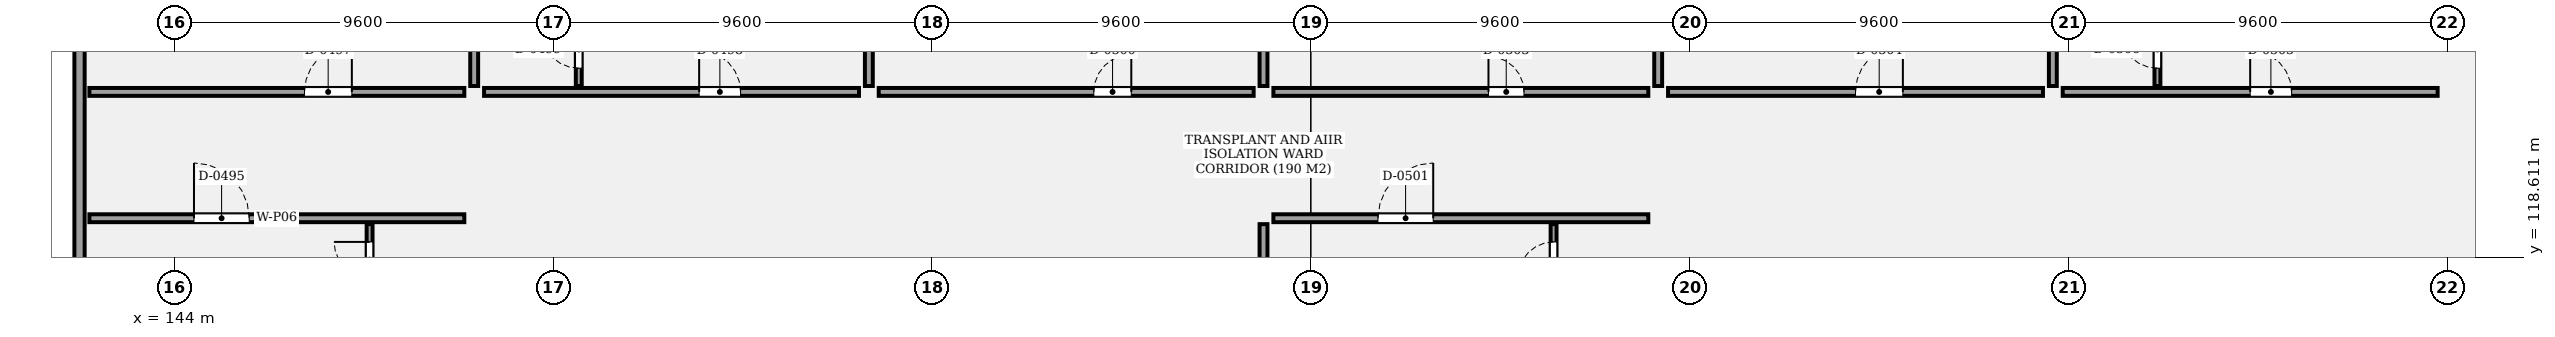
"""IFC4 building model, lengths in metres.
Left out: names, types, materials, properties, quantities, classifications, styles, units other than length and angle.
Written with IfcOpenShell. Run it as: python <this file> out.ifc"""

import sys

from ifc_helpers import new_model, si_unit, direction, frame, frame_2d, origin, place, context, subcontext, project, spatial, rectangle, extrude, element, fill, save


model = new_model("IFC4")
c1 = context("Model", 3, precision=1e-05, world=origin(), true_north=direction((0.0, 1.0)))
c2 = subcontext(c1, "Body", "Model", "MODEL_VIEW")
j1 = project(units=[si_unit("LENGTHUNIT", "METRE"), si_unit("PLANEANGLEUNIT", "RADIAN")], contexts=[c1])
p1 = place(None, origin())
s1 = spatial("IfcSite", under=j1, at=p1, CompositionType="ELEMENT")
p2 = place(p1, origin())
s2 = spatial("IfcBuilding", under=s1, at=p2, CompositionType="ELEMENT")
p3 = place(p2, frame((0.0, 0.0, 30.4)))
s3 = spatial("IfcBuildingStorey", under=s2, at=p3, CompositionType="ELEMENT", Elevation=30.4)
p4 = place(p3, frame((141.6, 108.16, 0.0), z_axis=(0.0, 0.0, 1.0), x_axis=(0.0, 1.0, 0.0)))
e1 = element("IfcWall", 1, at=p4, inside=s3, PredefinedType="SOLIDWALL", context=c2, shape_type="SweptSolid", body=[
    extrude(rectangle(XDim=26.08, YDim=0.26, at=frame_2d((13.04, 0.0))), origin(), (0.0, 0.0, 1.0), 2.58),
])
p5 = place(p3, frame((141.85, 119.6, 0.0), z_axis=(0.0, 0.0, 1.0), x_axis=(1.0, 0.0, 0.0)))
e2 = element("IfcWall", 2, at=p5, inside=s3, PredefinedType="PARTITIONING", context=c2, shape_type="SweptSolid", body=[
    extrude(rectangle(XDim=9.5, YDim=0.2, at=frame_2d((4.75, 0.0))), origin(), (0.0, 0.0, 1.0), 2.58),
])
p6 = place(p5, frame((2.65, 0.0, 0.0)))
e3 = element("IfcOpeningElement", 3, at=p6, cuts=e2, PredefinedType="OPENING", context=c2, shape_type="SweptSolid", body=[
    extrude(rectangle(XDim=1.4, YDim=2.4, at=frame_2d((0.7, 1.2))), frame((0.0, 0.11, 0.0), z_axis=(0.0, -1.0, 0.0), x_axis=(1.0, 0.0, 0.0)), (0.0, 0.0, 1.0), 0.22),
])
p7 = place(p3, frame((148.95, 117.15, 0.0), z_axis=(0.0, 0.0, 1.0), x_axis=(0.0, 1.0, 0.0)))
e4 = element("IfcWall", 4, at=p7, inside=s3, PredefinedType="PARTITIONING", context=c2, shape_type="SweptSolid", body=[
    extrude(rectangle(XDim=2.3, YDim=0.15, at=frame_2d((1.15, 0.0))), origin(), (0.0, 0.0, 1.0), 2.58),
])
p8 = place(p7, frame((0.95, 0.0, 0.0)))
e5 = element("IfcOpeningElement", 5, at=p8, cuts=e4, PredefinedType="OPENING", context=c2, shape_type="SweptSolid", body=[
    extrude(rectangle(XDim=0.9, YDim=2.1, at=frame_2d((0.45, 1.05))), frame((0.0, 0.085, 0.0), z_axis=(0.0, -1.0, 0.0), x_axis=(1.0, 0.0, 0.0)), (0.0, 0.0, 1.0), 0.17),
])
p9 = place(p3, frame((141.85, 122.8, 0.0), z_axis=(0.0, 0.0, 1.0), x_axis=(1.0, 0.0, 0.0)))
e6 = element("IfcWall", 6, at=p9, inside=s3, PredefinedType="PARTITIONING", context=c2, shape_type="SweptSolid", body=[
    extrude(rectangle(XDim=9.5, YDim=0.2, at=frame_2d((4.75, 0.0))), origin(), (0.0, 0.0, 1.0), 2.58),
])
p10 = place(p9, frame((5.45, 0.0, 0.0)))
e7 = element("IfcOpeningElement", 7, at=p10, cuts=e6, PredefinedType="OPENING", context=c2, shape_type="SweptSolid", body=[
    extrude(rectangle(XDim=1.2, YDim=2.4, at=frame_2d((0.6, 1.2))), frame((0.0, 0.11, 0.0), z_axis=(0.0, -1.0, 0.0), x_axis=(1.0, 0.0, 0.0)), (0.0, 0.0, 1.0), 0.22),
])
p11 = place(p3, frame((151.85, 122.8, 0.0), z_axis=(0.0, 0.0, 1.0), x_axis=(1.0, 0.0, 0.0)))
e8 = element("IfcWall", 8, at=p11, inside=s3, PredefinedType="PARTITIONING", context=c2, shape_type="SweptSolid", body=[
    extrude(rectangle(XDim=9.5, YDim=0.2, at=frame_2d((4.75, 0.0))), origin(), (0.0, 0.0, 1.0), 2.58),
])
p12 = place(p11, frame((5.45, 0.0, 0.0)))
e9 = element("IfcOpeningElement", 9, at=p12, cuts=e8, PredefinedType="OPENING", context=c2, shape_type="SweptSolid", body=[
    extrude(rectangle(XDim=1.05, YDim=2.2, at=frame_2d((0.525, 1.1))), frame((0.0, 0.11, 0.0), z_axis=(0.0, -1.0, 0.0), x_axis=(1.0, 0.0, 0.0)), (0.0, 0.0, 1.0), 0.22),
])
p13 = place(p3, frame((154.25, 122.95, 0.0), z_axis=(0.0, 0.0, 1.0), x_axis=(0.0, 1.0, 0.0)))
e10 = element("IfcWall", 10, at=p13, inside=s3, PredefinedType="PARTITIONING", context=c2, shape_type="SweptSolid", body=[
    extrude(rectangle(XDim=2.3, YDim=0.15, at=frame_2d((1.15, 0.0))), origin(), (0.0, 0.0, 1.0), 2.58),
])
p14 = place(p13, frame((0.45, 0.0, 0.0)))
e11 = element("IfcOpeningElement", 11, at=p14, cuts=e10, PredefinedType="OPENING", context=c2, shape_type="SweptSolid", body=[
    extrude(rectangle(XDim=0.95, YDim=2.1, at=frame_2d((0.475, 1.05))), frame((0.0, 0.085, 0.0), z_axis=(0.0, -1.0, 0.0), x_axis=(1.0, 0.0, 0.0)), (0.0, 0.0, 1.0), 0.17),
])
p15 = place(p3, frame((151.6, 122.95, 0.0), z_axis=(0.0, 0.0, 1.0), x_axis=(0.0, 1.0, 0.0)))
e12 = element("IfcWall", 12, at=p15, inside=s3, PredefinedType="PARTITIONING", context=c2, shape_type="SweptSolid", body=[
    extrude(rectangle(XDim=10.9, YDim=0.2, at=frame_2d((5.45, 0.0))), origin(), (0.0, 0.0, 1.0), 2.58),
])
p16 = place(p3, frame((161.85, 122.8, 0.0), z_axis=(0.0, 0.0, 1.0), x_axis=(1.0, 0.0, 0.0)))
e13 = element("IfcWall", 13, at=p16, inside=s3, PredefinedType="PARTITIONING", context=c2, shape_type="SweptSolid", body=[
    extrude(rectangle(XDim=9.5, YDim=0.2, at=frame_2d((4.75, 0.0))), origin(), (0.0, 0.0, 1.0), 2.58),
])
p17 = place(p16, frame((5.45, 0.0, 0.0)))
e14 = element("IfcOpeningElement", 14, at=p17, cuts=e13, PredefinedType="OPENING", context=c2, shape_type="SweptSolid", body=[
    extrude(rectangle(XDim=0.95, YDim=2.1, at=frame_2d((0.475, 1.05))), frame((0.0, 0.11, 0.0), z_axis=(0.0, -1.0, 0.0), x_axis=(1.0, 0.0, 0.0)), (0.0, 0.0, 1.0), 0.22),
])
p18 = place(p3, frame((161.6, 122.95, 0.0), z_axis=(0.0, 0.0, 1.0), x_axis=(0.0, 1.0, 0.0)))
e15 = element("IfcWall", 15, at=p18, inside=s3, PredefinedType="PARTITIONING", context=c2, shape_type="SweptSolid", body=[
    extrude(rectangle(XDim=10.9, YDim=0.2, at=frame_2d((5.45, 0.0))), origin(), (0.0, 0.0, 1.0), 2.58),
])
p19 = place(p3, frame((171.85, 119.6, 0.0), z_axis=(0.0, 0.0, 1.0), x_axis=(1.0, 0.0, 0.0)))
e16 = element("IfcWall", 16, at=p19, inside=s3, PredefinedType="PARTITIONING", context=c2, shape_type="SweptSolid", body=[
    extrude(rectangle(XDim=9.5, YDim=0.2, at=frame_2d((4.75, 0.0))), origin(), (0.0, 0.0, 1.0), 2.58),
])
p20 = place(p19, frame((2.65, 0.0, 0.0)))
e17 = element("IfcOpeningElement", 17, at=p20, cuts=e16, PredefinedType="OPENING", context=c2, shape_type="SweptSolid", body=[
    extrude(rectangle(XDim=1.4, YDim=2.4, at=frame_2d((0.7, 1.2))), frame((0.0, 0.11, 0.0), z_axis=(0.0, -1.0, 0.0), x_axis=(1.0, 0.0, 0.0)), (0.0, 0.0, 1.0), 0.22),
])
p21 = place(p3, frame((178.95, 117.15, 0.0), z_axis=(0.0, 0.0, 1.0), x_axis=(0.0, 1.0, 0.0)))
e18 = element("IfcWall", 18, at=p21, inside=s3, PredefinedType="PARTITIONING", context=c2, shape_type="SweptSolid", body=[
    extrude(rectangle(XDim=2.3, YDim=0.15, at=frame_2d((1.15, 0.0))), origin(), (0.0, 0.0, 1.0), 2.58),
])
p22 = place(p21, frame((0.95, 0.0, 0.0)))
e19 = element("IfcOpeningElement", 19, at=p22, cuts=e18, PredefinedType="OPENING", context=c2, shape_type="SweptSolid", body=[
    extrude(rectangle(XDim=0.9, YDim=2.1, at=frame_2d((0.45, 1.05))), frame((0.0, 0.085, 0.0), z_axis=(0.0, -1.0, 0.0), x_axis=(1.0, 0.0, 0.0)), (0.0, 0.0, 1.0), 0.17),
])
p23 = place(p3, frame((171.6, 108.55, 0.0), z_axis=(0.0, 0.0, 1.0), x_axis=(0.0, 1.0, 0.0)))
e20 = element("IfcWall", 20, at=p23, inside=s3, PredefinedType="PARTITIONING", context=c2, shape_type="SweptSolid", body=[
    extrude(rectangle(XDim=10.9, YDim=0.2, at=frame_2d((5.45, 0.0))), origin(), (0.0, 0.0, 1.0), 2.58),
])
p24 = place(p3, frame((171.85, 122.8, 0.0), z_axis=(0.0, 0.0, 1.0), x_axis=(1.0, 0.0, 0.0)))
e21 = element("IfcWall", 21, at=p24, inside=s3, PredefinedType="PARTITIONING", context=c2, shape_type="SweptSolid", body=[
    extrude(rectangle(XDim=9.5, YDim=0.2, at=frame_2d((4.75, 0.0))), origin(), (0.0, 0.0, 1.0), 2.58),
])
p25 = place(p24, frame((5.45, 0.0, 0.0)))
e22 = element("IfcOpeningElement", 22, at=p25, cuts=e21, PredefinedType="OPENING", context=c2, shape_type="SweptSolid", body=[
    extrude(rectangle(XDim=0.9, YDim=2.1, at=frame_2d((0.45, 1.05))), frame((0.0, 0.11, 0.0), z_axis=(0.0, -1.0, 0.0), x_axis=(1.0, 0.0, 0.0)), (0.0, 0.0, 1.0), 0.22),
])
p26 = place(p3, frame((171.6, 122.95, 0.0), z_axis=(0.0, 0.0, 1.0), x_axis=(0.0, 1.0, 0.0)))
e23 = element("IfcWall", 23, at=p26, inside=s3, PredefinedType="PARTITIONING", context=c2, shape_type="SweptSolid", body=[
    extrude(rectangle(XDim=10.9, YDim=0.2, at=frame_2d((5.45, 0.0))), origin(), (0.0, 0.0, 1.0), 2.58),
])
p27 = place(p3, frame((181.85, 122.8, 0.0), z_axis=(0.0, 0.0, 1.0), x_axis=(1.0, 0.0, 0.0)))
e24 = element("IfcWall", 24, at=p27, inside=s3, PredefinedType="PARTITIONING", context=c2, shape_type="SweptSolid", body=[
    extrude(rectangle(XDim=9.5, YDim=0.2, at=frame_2d((4.75, 0.0))), origin(), (0.0, 0.0, 1.0), 2.58),
])
p28 = place(p27, frame((4.75, 0.0, 0.0)))
e25 = element("IfcOpeningElement", 25, at=p28, cuts=e24, PredefinedType="OPENING", context=c2, shape_type="SweptSolid", body=[
    extrude(rectangle(XDim=1.2, YDim=2.4, at=frame_2d((0.6, 1.2))), frame((0.0, 0.11, 0.0), z_axis=(0.0, -1.0, 0.0), x_axis=(1.0, 0.0, 0.0)), (0.0, 0.0, 1.0), 0.22),
])
p29 = place(p3, frame((181.6, 122.95, 0.0), z_axis=(0.0, 0.0, 1.0), x_axis=(0.0, 1.0, 0.0)))
e26 = element("IfcWall", 26, at=p29, inside=s3, PredefinedType="PARTITIONING", context=c2, shape_type="SweptSolid", body=[
    extrude(rectangle(XDim=10.9, YDim=0.2, at=frame_2d((5.45, 0.0))), origin(), (0.0, 0.0, 1.0), 2.58),
])
p30 = place(p3, frame((191.85, 122.8, 0.0), z_axis=(0.0, 0.0, 1.0), x_axis=(1.0, 0.0, 0.0)))
e27 = element("IfcWall", 27, at=p30, inside=s3, PredefinedType="PARTITIONING", context=c2, shape_type="SweptSolid", body=[
    extrude(rectangle(XDim=9.5, YDim=0.2, at=frame_2d((4.75, 0.0))), origin(), (0.0, 0.0, 1.0), 2.58),
])
p31 = place(p30, frame((4.75, 0.0, 0.0)))
e28 = element("IfcOpeningElement", 28, at=p31, cuts=e27, PredefinedType="OPENING", context=c2, shape_type="SweptSolid", body=[
    extrude(rectangle(XDim=1.05, YDim=2.2, at=frame_2d((0.525, 1.1))), frame((0.0, 0.11, 0.0), z_axis=(0.0, -1.0, 0.0), x_axis=(1.0, 0.0, 0.0)), (0.0, 0.0, 1.0), 0.22),
])
p32 = place(p3, frame((194.25, 122.95, 0.0), z_axis=(0.0, 0.0, 1.0), x_axis=(0.0, 1.0, 0.0)))
e29 = element("IfcWall", 29, at=p32, inside=s3, PredefinedType="PARTITIONING", context=c2, shape_type="SweptSolid", body=[
    extrude(rectangle(XDim=2.3, YDim=0.15, at=frame_2d((1.15, 0.0))), origin(), (0.0, 0.0, 1.0), 2.58),
])
p33 = place(p32, frame((0.45, 0.0, 0.0)))
e30 = element("IfcOpeningElement", 30, at=p33, cuts=e29, PredefinedType="OPENING", context=c2, shape_type="SweptSolid", body=[
    extrude(rectangle(XDim=0.95, YDim=2.1, at=frame_2d((0.475, 1.05))), frame((0.0, 0.085, 0.0), z_axis=(0.0, -1.0, 0.0), x_axis=(1.0, 0.0, 0.0)), (0.0, 0.0, 1.0), 0.17),
])
p34 = place(p3, frame((191.6, 122.95, 0.0), z_axis=(0.0, 0.0, 1.0), x_axis=(0.0, 1.0, 0.0)))
e31 = element("IfcWall", 31, at=p34, inside=s3, PredefinedType="PARTITIONING", context=c2, shape_type="SweptSolid", body=[
    extrude(rectangle(XDim=10.9, YDim=0.2, at=frame_2d((5.45, 0.0))), origin(), (0.0, 0.0, 1.0), 2.58),
])
p35 = place(p6, origin())
e32 = element("IfcDoor", 32, at=p35, inside=s3, OperationType="SINGLE_SWING_LEFT", PredefinedType="DOOR", context=c2, shape_type="SweptSolid", body=[
    extrude(rectangle(XDim=1.4, YDim=2.4, at=frame_2d((0.7, 1.2))), frame((0.0, 0.025, 0.0), z_axis=(0.0, -1.0, 0.0), x_axis=(1.0, 0.0, 0.0)), (0.0, 0.0, 1.0), 0.05),
])
fill(e3, e32)
p36 = place(p8, origin())
e33 = element("IfcDoor", 33, at=p36, inside=s3, OperationType="SINGLE_SWING_RIGHT", PredefinedType="DOOR", context=c2, shape_type="SweptSolid", body=[
    extrude(rectangle(XDim=0.9, YDim=2.1, at=frame_2d((0.45, 1.05))), frame((0.0, 0.025, 0.0), z_axis=(0.0, -1.0, 0.0), x_axis=(1.0, 0.0, 0.0)), (0.0, 0.0, 1.0), 0.05),
])
fill(e5, e33)
p37 = place(p10, origin())
e34 = element("IfcDoor", 34, at=p37, inside=s3, OperationType="SINGLE_SWING_RIGHT", PredefinedType="DOOR", context=c2, shape_type="SweptSolid", body=[
    extrude(rectangle(XDim=1.2, YDim=2.4, at=frame_2d((0.6, 1.2))), frame((0.0, 0.025, 0.0), z_axis=(0.0, -1.0, 0.0), x_axis=(1.0, 0.0, 0.0)), (0.0, 0.0, 1.0), 0.05),
])
fill(e7, e34)
p38 = place(p12, origin())
e35 = element("IfcDoor", 35, at=p38, inside=s3, OperationType="SINGLE_SWING_LEFT", PredefinedType="DOOR", context=c2, shape_type="SweptSolid", body=[
    extrude(rectangle(XDim=1.05, YDim=2.2, at=frame_2d((0.525, 1.1))), frame((0.0, 0.025, 0.0), z_axis=(0.0, -1.0, 0.0), x_axis=(1.0, 0.0, 0.0)), (0.0, 0.0, 1.0), 0.05),
])
fill(e9, e35)
p39 = place(p14, origin())
e36 = element("IfcDoor", 36, at=p39, inside=s3, OperationType="SINGLE_SWING_RIGHT", PredefinedType="DOOR", context=c2, shape_type="SweptSolid", body=[
    extrude(rectangle(XDim=0.95, YDim=2.1, at=frame_2d((0.475, 1.05))), frame((0.0, 0.025, 0.0), z_axis=(0.0, -1.0, 0.0), x_axis=(1.0, 0.0, 0.0)), (0.0, 0.0, 1.0), 0.05),
])
fill(e11, e36)
p40 = place(p17, origin())
e37 = element("IfcDoor", 37, at=p40, inside=s3, OperationType="SINGLE_SWING_RIGHT", PredefinedType="DOOR", context=c2, shape_type="SweptSolid", body=[
    extrude(rectangle(XDim=0.95, YDim=2.1, at=frame_2d((0.475, 1.05))), frame((0.0, 0.025, 0.0), z_axis=(0.0, -1.0, 0.0), x_axis=(1.0, 0.0, 0.0)), (0.0, 0.0, 1.0), 0.05),
])
fill(e14, e37)
p41 = place(p20, origin())
e38 = element("IfcDoor", 38, at=p41, inside=s3, OperationType="SINGLE_SWING_RIGHT", PredefinedType="DOOR", context=c2, shape_type="SweptSolid", body=[
    extrude(rectangle(XDim=1.4, YDim=2.4, at=frame_2d((0.7, 1.2))), frame((0.0, 0.025, 0.0), z_axis=(0.0, -1.0, 0.0), x_axis=(1.0, 0.0, 0.0)), (0.0, 0.0, 1.0), 0.05),
])
fill(e17, e38)
p42 = place(p22, origin())
e39 = element("IfcDoor", 39, at=p42, inside=s3, OperationType="SINGLE_SWING_LEFT", PredefinedType="DOOR", context=c2, shape_type="SweptSolid", body=[
    extrude(rectangle(XDim=0.9, YDim=2.1, at=frame_2d((0.45, 1.05))), frame((0.0, 0.025, 0.0), z_axis=(0.0, -1.0, 0.0), x_axis=(1.0, 0.0, 0.0)), (0.0, 0.0, 1.0), 0.05),
])
fill(e19, e39)
p43 = place(p25, origin())
e40 = element("IfcDoor", 40, at=p43, inside=s3, OperationType="SINGLE_SWING_LEFT", PredefinedType="DOOR", context=c2, shape_type="SweptSolid", body=[
    extrude(rectangle(XDim=0.9, YDim=2.1, at=frame_2d((0.45, 1.05))), frame((0.0, 0.025, 0.0), z_axis=(0.0, -1.0, 0.0), x_axis=(1.0, 0.0, 0.0)), (0.0, 0.0, 1.0), 0.05),
])
fill(e22, e40)
p44 = place(p28, origin())
e41 = element("IfcDoor", 41, at=p44, inside=s3, OperationType="SINGLE_SWING_RIGHT", PredefinedType="DOOR", context=c2, shape_type="SweptSolid", body=[
    extrude(rectangle(XDim=1.2, YDim=2.4, at=frame_2d((0.6, 1.2))), frame((0.0, 0.025, 0.0), z_axis=(0.0, -1.0, 0.0), x_axis=(1.0, 0.0, 0.0)), (0.0, 0.0, 1.0), 0.05),
])
fill(e25, e41)
p45 = place(p31, origin())
e42 = element("IfcDoor", 42, at=p45, inside=s3, OperationType="SINGLE_SWING_LEFT", PredefinedType="DOOR", context=c2, shape_type="SweptSolid", body=[
    extrude(rectangle(XDim=1.05, YDim=2.2, at=frame_2d((0.525, 1.1))), frame((0.0, 0.025, 0.0), z_axis=(0.0, -1.0, 0.0), x_axis=(1.0, 0.0, 0.0)), (0.0, 0.0, 1.0), 0.05),
])
fill(e28, e42)
p46 = place(p33, origin())
e43 = element("IfcDoor", 43, at=p46, inside=s3, OperationType="SINGLE_SWING_RIGHT", PredefinedType="DOOR", context=c2, shape_type="SweptSolid", body=[
    extrude(rectangle(XDim=0.95, YDim=2.1, at=frame_2d((0.475, 1.05))), frame((0.0, 0.025, 0.0), z_axis=(0.0, -1.0, 0.0), x_axis=(1.0, 0.0, 0.0)), (0.0, 0.0, 1.0), 0.05),
])
fill(e30, e43)
save(model, sys.argv[1])
